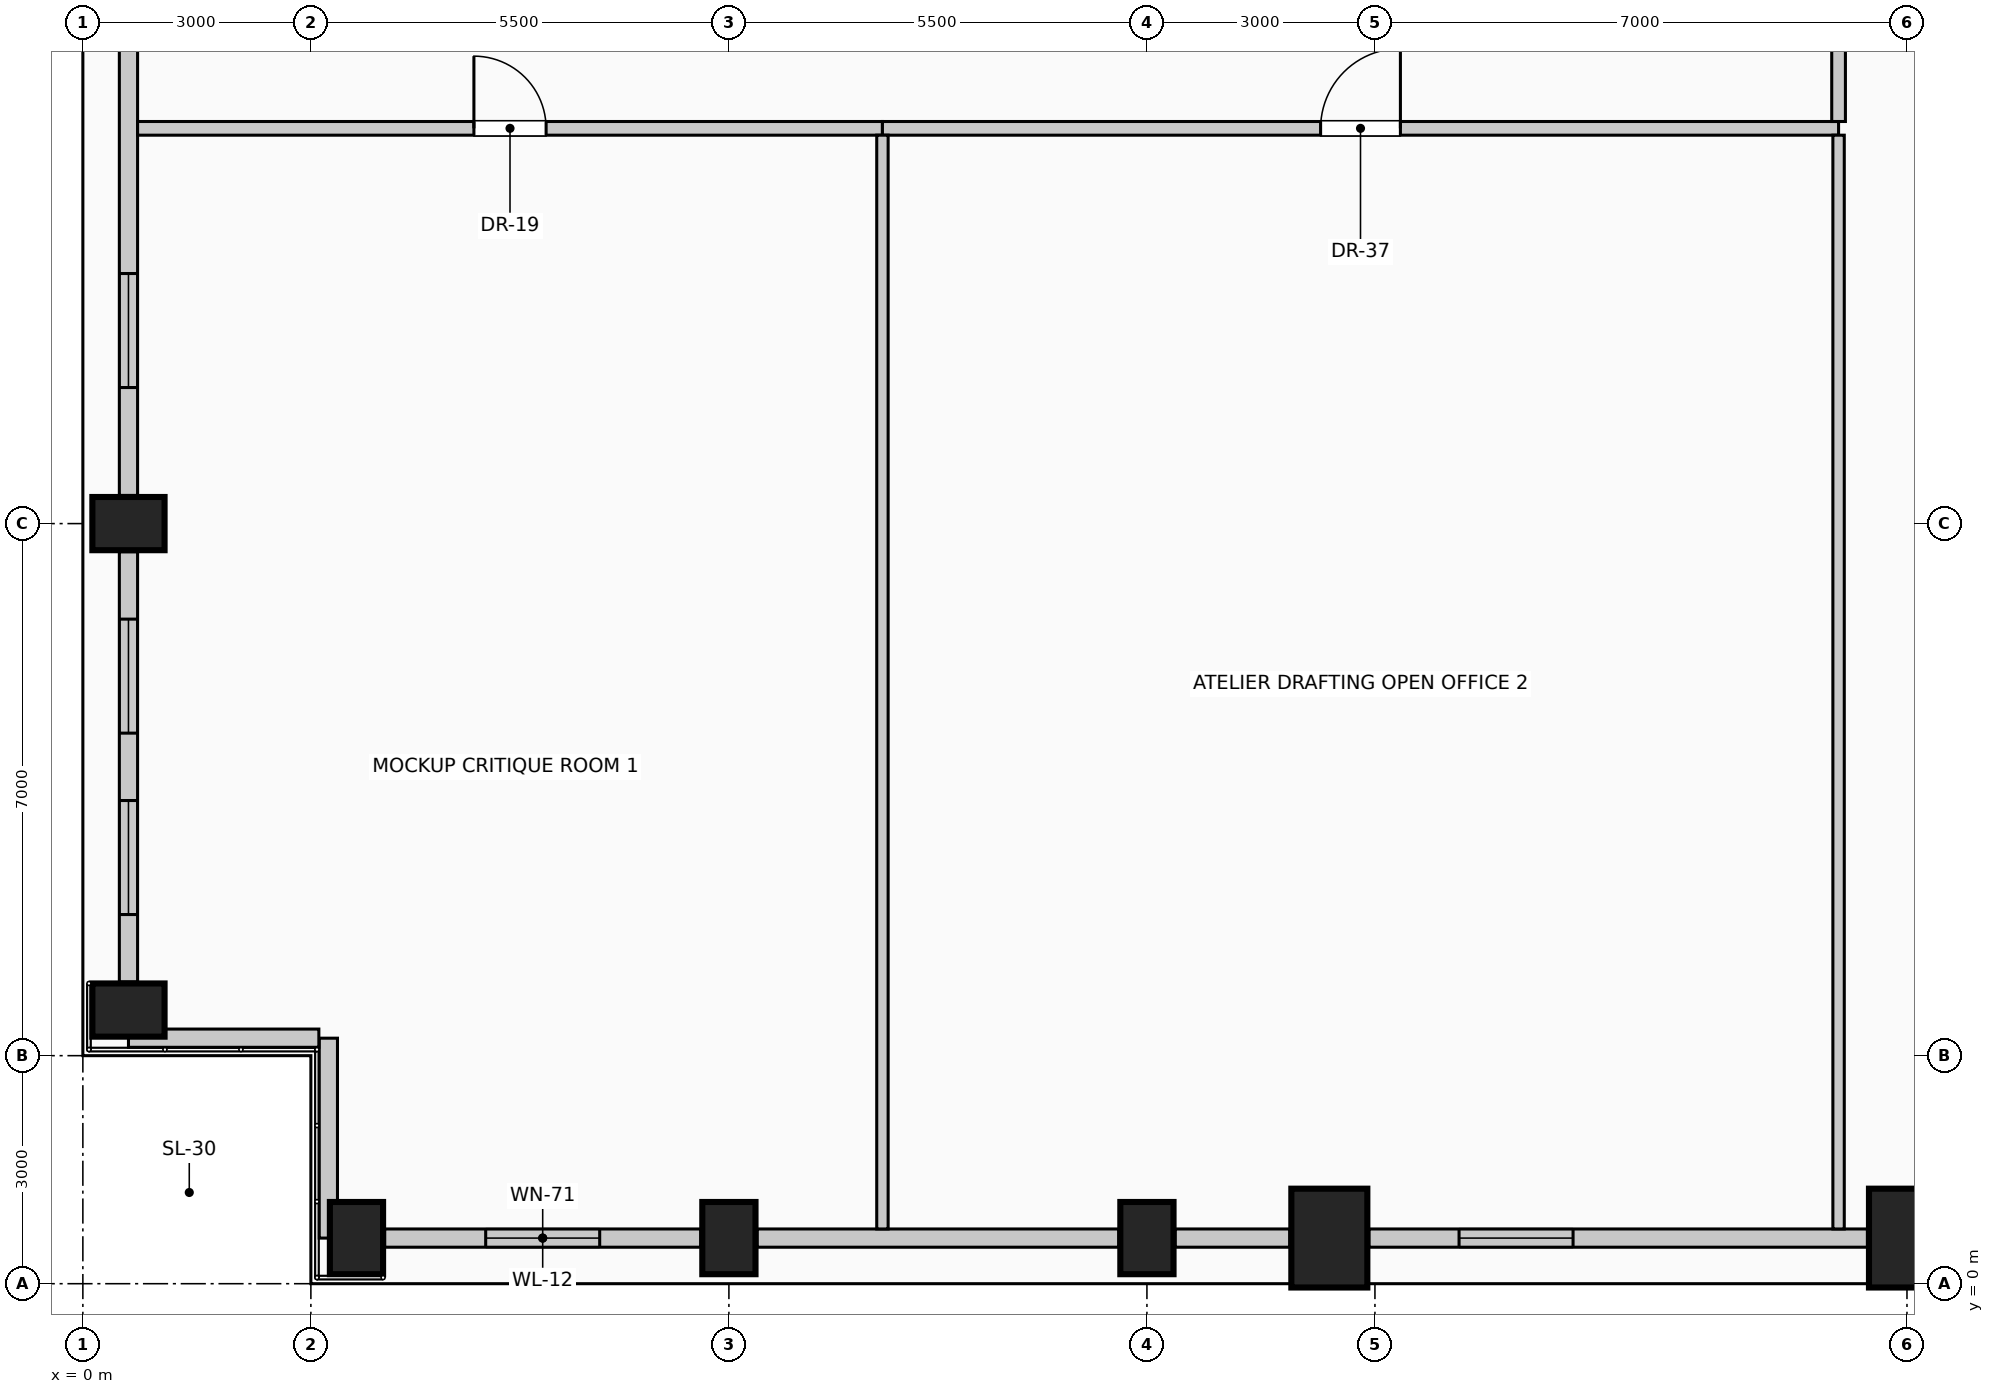
"""IFC4 building model, lengths in metres.
Left out: names, types, materials, properties, quantities, classifications, styles, units other than length and angle.
Written with IfcOpenShell. Run it as: python <this file> out.ifc"""

import sys

from ifc_helpers import new_model, si_unit, direction, frame, frame_2d, origin, origin_2d, place, context, subcontext, project, spatial, rectangle, extrude, element, fill, save


model = new_model("IFC4")
c1 = context("Model", 3, precision=1e-05, world=origin(), true_north=direction((0.0, 1.0)))
c2 = subcontext(c1, "Body", "Model", "MODEL_VIEW")
j1 = project(units=[si_unit("LENGTHUNIT", "METRE"), si_unit("PLANEANGLEUNIT", "RADIAN")], contexts=[c1])
p1 = place(None, origin())
s1 = spatial("IfcSite", under=j1, at=p1, CompositionType="ELEMENT")
p2 = place(p1, origin())
s2 = spatial("IfcBuilding", under=s1, at=p2, CompositionType="ELEMENT")
p3 = place(p2, frame((0.0, 0.0, 276.6)))
s3 = spatial("IfcBuildingStorey", under=s2, at=p3, CompositionType="ELEMENT", Elevation=276.6)
for number, where, z_axis, x_axis in (
    (1, (3.6, 0.6, 0.0), (0.0, 0.0, 1.0), (1.0, 0.0, 0.0)),
    (2, (8.5, 0.6, 0.0), (0.0, 0.0, 1.0), (1.0, 0.0, 0.0)),
    (3, (14.0, 0.6, 0.0), (0.0, 0.0, 1.0), (1.0, 0.0, 0.0)),
):
    element("IfcColumn", number, at=place(p3, frame(where, z_axis=z_axis, x_axis=x_axis)), inside=s3, PredefinedType="COLUMN", context=c2, shape_type="SweptSolid", body=[
        extrude(rectangle(XDim=0.7, YDim=0.95, at=origin_2d()), origin(), (0.0, 0.0, 1.0), 4.0),
    ])
for number, where, z_axis, x_axis in (
    (4, (16.4, 0.6, 0.0), (0.0, 0.0, 1.0), (1.0, 0.0, 0.0)),
    (5, (24.0, 0.6, 0.0), (0.0, 0.0, 1.0), (1.0, 0.0, 0.0)),
):
    element("IfcColumn", number, at=place(p3, frame(where, z_axis=z_axis, x_axis=x_axis)), inside=s3, PredefinedType="COLUMN", context=c2, shape_type="SweptSolid", body=[
        extrude(rectangle(XDim=1.0, YDim=1.3, at=origin_2d()), origin(), (0.0, 0.0, 1.0), 4.0),
    ])
for number, where, z_axis, x_axis in (
    (6, (0.6, 3.6, 0.0), (0.0, 0.0, 1.0), (0.0, 1.0, 0.0)),
    (7, (0.6, 10.0, 0.0), (0.0, 0.0, 1.0), (0.0, 1.0, 0.0)),
):
    element("IfcColumn", number, at=place(p3, frame(where, z_axis=z_axis, x_axis=x_axis)), inside=s3, PredefinedType="COLUMN", context=c2, shape_type="SweptSolid", body=[
        extrude(rectangle(XDim=0.7, YDim=0.95, at=origin_2d()), origin(), (0.0, 0.0, 1.0), 4.0),
    ])
p4 = place(p3, frame((8.13, 0.6, 0.0), z_axis=(0.0, 0.0, 1.0), x_axis=(-1.0, 0.0, 0.0)))
e8 = element("IfcWall", 8, at=p4, inside=s3, PredefinedType="SOLIDWALL", context=c2, shape_type="SweptSolid", body=[
    extrude(rectangle(XDim=4.16, YDim=0.24, at=frame_2d((2.08, 0.0))), origin(), (0.0, 0.0, 1.0), 2.91),
])
p5 = place(p4, frame((1.33, 0.0, 0.42)))
e9 = element("IfcOpeningElement", 9, at=p5, cuts=e8, PredefinedType="OPENING", context=c2, shape_type="SweptSolid", body=[
    extrude(rectangle(XDim=1.5, YDim=2.2, at=frame_2d((0.75, 1.1))), frame((0.0, 0.13, 0.0), z_axis=(0.0, -1.0, 0.0), x_axis=(1.0, 0.0, 0.0)), (0.0, 0.0, 1.0), 0.26),
])
p6 = place(p3, frame((13.63, 0.6, 0.0), z_axis=(0.0, 0.0, 1.0), x_axis=(-1.0, 0.0, 0.0)))
e10 = element("IfcWall", 10, at=p6, inside=s3, PredefinedType="SOLIDWALL", context=c2, shape_type="SweptSolid", body=[
    extrude(rectangle(XDim=4.76, YDim=0.24, at=frame_2d((2.38, 0.0))), origin(), (0.0, 0.0, 1.0), 2.91),
])
p7 = place(p3, frame((15.88, 0.6, 0.0), z_axis=(0.0, 0.0, 1.0), x_axis=(-1.0, 0.0, 0.0)))
e11 = element("IfcWall", 11, at=p7, inside=s3, PredefinedType="SOLIDWALL", context=c2, shape_type="SweptSolid", body=[
    extrude(rectangle(XDim=1.51, YDim=0.24, at=frame_2d((0.755, 0.0))), origin(), (0.0, 0.0, 1.0), 2.91),
])
p8 = place(p3, frame((23.48, 0.6, 0.0), z_axis=(0.0, 0.0, 1.0), x_axis=(-1.0, 0.0, 0.0)))
e12 = element("IfcWall", 12, at=p8, inside=s3, PredefinedType="SOLIDWALL", context=c2, shape_type="SweptSolid", body=[
    extrude(rectangle(XDim=6.56, YDim=0.24, at=frame_2d((3.28, 0.0))), origin(), (0.0, 0.0, 1.0), 2.91),
])
p9 = place(p8, frame((3.873, 0.0, 0.42)))
e13 = element("IfcOpeningElement", 13, at=p9, cuts=e12, PredefinedType="OPENING", context=c2, shape_type="SweptSolid", body=[
    extrude(rectangle(XDim=1.5, YDim=2.2, at=frame_2d((0.75, 1.1))), frame((0.0, 0.13, 0.0), z_axis=(0.0, -1.0, 0.0), x_axis=(1.0, 0.0, 0.0)), (0.0, 0.0, 1.0), 0.26),
])
p10 = place(p3, frame((0.6, 3.97, 0.0), z_axis=(0.0, 0.0, 1.0), x_axis=(0.0, 1.0, 0.0)))
e14 = element("IfcWall", 14, at=p10, inside=s3, PredefinedType="SOLIDWALL", context=c2, shape_type="SweptSolid", body=[
    extrude(rectangle(XDim=5.66, YDim=0.24, at=frame_2d((2.83, 0.0))), origin(), (0.0, 0.0, 1.0), 2.91),
])
p11 = place(p10, frame((0.887, 0.0, 0.42)))
e15 = element("IfcOpeningElement", 15, at=p11, cuts=e14, PredefinedType="OPENING", context=c2, shape_type="SweptSolid", body=[
    extrude(rectangle(XDim=1.5, YDim=2.2, at=frame_2d((0.75, 1.1))), frame((0.0, 0.13, 0.0), z_axis=(0.0, -1.0, 0.0), x_axis=(1.0, 0.0, 0.0)), (0.0, 0.0, 1.0), 0.26),
])
p12 = place(p10, frame((3.273, 0.0, 0.42)))
e16 = element("IfcOpeningElement", 16, at=p12, cuts=e14, PredefinedType="OPENING", context=c2, shape_type="SweptSolid", body=[
    extrude(rectangle(XDim=1.5, YDim=2.2, at=frame_2d((0.75, 1.1))), frame((0.0, 0.13, 0.0), z_axis=(0.0, -1.0, 0.0), x_axis=(1.0, 0.0, 0.0)), (0.0, 0.0, 1.0), 0.26),
])
p13 = place(p3, frame((0.6, 10.37, 0.0), z_axis=(0.0, 0.0, 1.0), x_axis=(0.0, 1.0, 0.0)))
e17 = element("IfcWall", 17, at=p13, inside=s3, PredefinedType="SOLIDWALL", context=c2, shape_type="SweptSolid", body=[
    extrude(rectangle(XDim=7.26, YDim=0.24, at=frame_2d((3.63, 0.0))), origin(), (0.0, 0.0, 1.0), 2.91),
])
p14 = place(p13, frame((1.42, 0.0, 0.42)))
e18 = element("IfcOpeningElement", 18, at=p14, cuts=e17, PredefinedType="OPENING", context=c2, shape_type="SweptSolid", body=[
    extrude(rectangle(XDim=1.5, YDim=2.2, at=frame_2d((0.75, 1.1))), frame((0.0, 0.13, 0.0), z_axis=(0.0, -1.0, 0.0), x_axis=(1.0, 0.0, 0.0)), (0.0, 0.0, 1.0), 0.26),
])
p15 = place(p3, frame((3.23, 0.6, 0.0), z_axis=(0.0, 0.0, 1.0), x_axis=(0.0, 1.0, 0.0)))
e19 = element("IfcWall", 19, at=p15, inside=s3, PredefinedType="SOLIDWALL", context=c2, shape_type="SweptSolid", body=[
    extrude(rectangle(XDim=2.63, YDim=0.24, at=frame_2d((1.315, 0.0))), origin(), (0.0, 0.0, 1.0), 3.66),
])
p16 = place(p3, frame((3.105, 3.23, 0.0), z_axis=(0.0, 0.0, 1.0), x_axis=(-1.0, 0.0, 0.0)))
e20 = element("IfcWall", 20, at=p16, inside=s3, PredefinedType="SOLIDWALL", context=c2, shape_type="SweptSolid", body=[
    extrude(rectangle(XDim=2.505, YDim=0.24, at=frame_2d((1.252, 0.0))), origin(), (0.0, 0.0, 1.0), 3.66),
])
p17 = place(p3, frame((0.72, 15.2, 0.0), z_axis=(0.0, 0.0, 1.0), x_axis=(1.0, 0.0, 0.0)))
e21 = element("IfcWall", 21, at=p17, inside=s3, PredefinedType="PARTITIONING", context=c2, shape_type="SweptSolid", body=[
    extrude(rectangle(XDim=9.8, YDim=0.18, at=frame_2d((4.9, 0.0))), origin(), (0.0, 0.0, 1.0), 3.66),
])
p18 = place(p17, frame((4.425, 0.0, 0.0)))
e22 = element("IfcOpeningElement", 22, at=p18, cuts=e21, PredefinedType="OPENING", context=c2, shape_type="SweptSolid", body=[
    extrude(rectangle(XDim=0.95, YDim=2.15, at=frame_2d((0.475, 1.075))), frame((0.0, 0.1, 0.0), z_axis=(0.0, -1.0, 0.0), x_axis=(1.0, 0.0, 0.0)), (0.0, 0.0, 1.0), 0.2),
])
p19 = place(p3, frame((10.52, 15.2, 0.0), z_axis=(0.0, 0.0, 1.0), x_axis=(1.0, 0.0, 0.0)))
e23 = element("IfcWall", 23, at=p19, inside=s3, PredefinedType="PARTITIONING", context=c2, shape_type="SweptSolid", body=[
    extrude(rectangle(XDim=12.58, YDim=0.18, at=frame_2d((6.29, 0.0))), origin(), (0.0, 0.0, 1.0), 3.66),
])
p20 = place(p19, frame((5.765, 0.0, 0.0)))
e24 = element("IfcOpeningElement", 24, at=p20, cuts=e23, PredefinedType="OPENING", context=c2, shape_type="SweptSolid", body=[
    extrude(rectangle(XDim=1.05, YDim=2.15, at=frame_2d((0.525, 1.075))), frame((0.0, 0.1, 0.0), z_axis=(0.0, -1.0, 0.0), x_axis=(1.0, 0.0, 0.0)), (0.0, 0.0, 1.0), 0.2),
])
for number, where, z_axis, x_axis in (
    (25, (10.52, 0.72, 0.0), (0.0, 0.0, 1.0), (0.0, 1.0, 0.0)),
    (26, (23.1, 0.72, 0.0), (0.0, 0.0, 1.0), (0.0, 1.0, 0.0)),
):
    element("IfcWall", number, at=place(p3, frame(where, z_axis=z_axis, x_axis=x_axis)), inside=s3, PredefinedType="PARTITIONING", context=c2, shape_type="SweptSolid", body=[
        extrude(rectangle(XDim=14.39, YDim=0.15, at=frame_2d((7.195, 0.0))), origin(), (0.0, 0.0, 1.0), 3.66),
    ])
p21 = place(p3, frame((23.1, 15.29, 0.0), z_axis=(0.0, 0.0, 1.0), x_axis=(0.0, 1.0, 0.0)))
e27 = element("IfcWall", 27, at=p21, inside=s3, PredefinedType="PARTITIONING", context=c2, shape_type="SweptSolid", body=[
    extrude(rectangle(XDim=2.01, YDim=0.18, at=frame_2d((1.005, 0.0))), origin(), (0.0, 0.0, 1.0), 3.66),
])
p22 = place(p5, origin())
e28 = element("IfcWindow", 28, at=p22, inside=s3, PartitioningType="SINGLE_PANEL", PredefinedType="WINDOW", context=c2, shape_type="SweptSolid", body=[
    extrude(rectangle(XDim=1.5, YDim=2.2, at=frame_2d((0.75, 1.1))), frame((0.0, 0.03, 0.0), z_axis=(0.0, -1.0, 0.0), x_axis=(1.0, 0.0, 0.0)), (0.0, 0.0, 1.0), 0.06),
])
fill(e9, e28)
p23 = place(p9, origin())
e29 = element("IfcWindow", 29, at=p23, inside=s3, PartitioningType="SINGLE_PANEL", PredefinedType="WINDOW", context=c2, shape_type="SweptSolid", body=[
    extrude(rectangle(XDim=1.5, YDim=2.2, at=frame_2d((0.75, 1.1))), frame((0.0, 0.03, 0.0), z_axis=(0.0, -1.0, 0.0), x_axis=(1.0, 0.0, 0.0)), (0.0, 0.0, 1.0), 0.06),
])
fill(e13, e29)
p24 = place(p11, origin())
e30 = element("IfcWindow", 30, at=p24, inside=s3, PartitioningType="SINGLE_PANEL", PredefinedType="WINDOW", context=c2, shape_type="SweptSolid", body=[
    extrude(rectangle(XDim=1.5, YDim=2.2, at=frame_2d((0.75, 1.1))), frame((0.0, 0.03, 0.0), z_axis=(0.0, -1.0, 0.0), x_axis=(1.0, 0.0, 0.0)), (0.0, 0.0, 1.0), 0.06),
])
fill(e15, e30)
p25 = place(p12, origin())
e31 = element("IfcWindow", 31, at=p25, inside=s3, PartitioningType="SINGLE_PANEL", PredefinedType="WINDOW", context=c2, shape_type="SweptSolid", body=[
    extrude(rectangle(XDim=1.5, YDim=2.2, at=frame_2d((0.75, 1.1))), frame((0.0, 0.03, 0.0), z_axis=(0.0, -1.0, 0.0), x_axis=(1.0, 0.0, 0.0)), (0.0, 0.0, 1.0), 0.06),
])
fill(e16, e31)
p26 = place(p14, origin())
e32 = element("IfcWindow", 32, at=p26, inside=s3, PartitioningType="SINGLE_PANEL", PredefinedType="WINDOW", context=c2, shape_type="SweptSolid", body=[
    extrude(rectangle(XDim=1.5, YDim=2.2, at=frame_2d((0.75, 1.1))), frame((0.0, 0.03, 0.0), z_axis=(0.0, -1.0, 0.0), x_axis=(1.0, 0.0, 0.0)), (0.0, 0.0, 1.0), 0.06),
])
fill(e18, e32)
p27 = place(p18, origin())
e33 = element("IfcDoor", 33, at=p27, inside=s3, OperationType="SINGLE_SWING_LEFT", PredefinedType="DOOR", context=c2, shape_type="SweptSolid", body=[
    extrude(rectangle(XDim=0.95, YDim=2.15, at=frame_2d((0.475, 1.075))), frame((0.0, 0.025, 0.0), z_axis=(0.0, -1.0, 0.0), x_axis=(1.0, 0.0, 0.0)), (0.0, 0.0, 1.0), 0.05),
])
fill(e22, e33)
p28 = place(p20, origin())
e34 = element("IfcDoor", 34, at=p28, inside=s3, OperationType="SINGLE_SWING_RIGHT", PredefinedType="DOOR", context=c2, shape_type="SweptSolid", body=[
    extrude(rectangle(XDim=1.05, YDim=2.15, at=frame_2d((0.525, 1.075))), frame((0.0, 0.025, 0.0), z_axis=(0.0, -1.0, 0.0), x_axis=(1.0, 0.0, 0.0)), (0.0, 0.0, 1.0), 0.05),
])
fill(e24, e34)
save(model, sys.argv[1])
